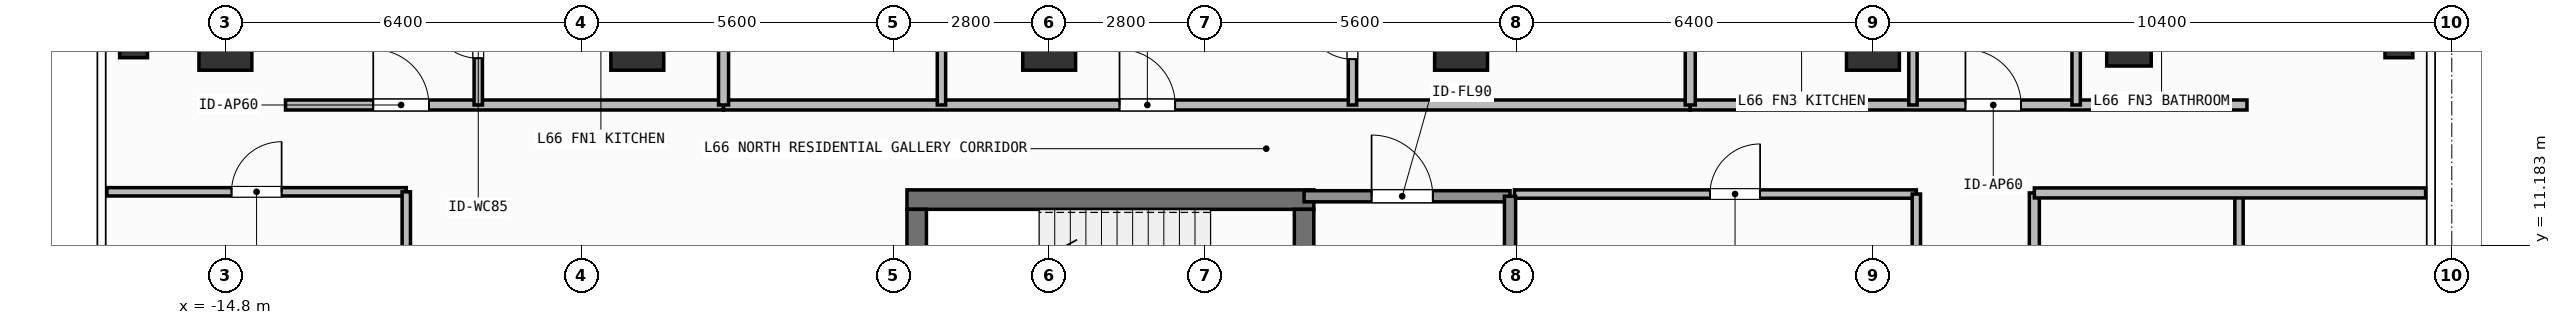
"""IFC4 building model, lengths in metres.
Left out: names, types, materials, properties, quantities, classifications, styles, units other than length and angle.
Written with IfcOpenShell. Run it as: python <this file> out.ifc"""

import sys

from ifc_helpers import new_model, si_unit, direction, frame, frame_2d, origin, origin_2d, place, context, subcontext, project, spatial, rectangle, hollow_rectangle, extrude, element, fill, save


model = new_model("IFC4")
c1 = context("Model", 3, precision=1e-05, world=origin(), true_north=direction((0.0, 1.0)))
c2 = subcontext(c1, "Body", "Model", "MODEL_VIEW")
j1 = project(units=[si_unit("LENGTHUNIT", "METRE"), si_unit("PLANEANGLEUNIT", "RADIAN")], contexts=[c1])
p1 = place(None, origin())
s1 = spatial("IfcSite", under=j1, at=p1, CompositionType="ELEMENT")
p2 = place(p1, origin())
s2 = spatial("IfcBuilding", under=s1, at=p2, CompositionType="ELEMENT")
p3 = place(p2, frame((0.0, 0.0, 270.3)))
s3 = spatial("IfcBuildingStorey", under=s2, at=p3, CompositionType="ELEMENT", Elevation=270.3)
p4 = place(p3, frame((-2.555, 12.0, 0.0), z_axis=(0.0, 0.0, 1.0), x_axis=(1.0, 0.0, 0.0)))
e1 = element("IfcWall", 1, at=p4, inside=s3, PredefinedType="SHEAR", context=c2, shape_type="SweptSolid", body=[
    extrude(rectangle(XDim=7.31, YDim=0.35, at=frame_2d((3.655, 0.0))), origin(), (0.0, 0.0, 1.0), 3.9),
])
p5 = place(p3, frame((-2.38, 8.9, 0.0), z_axis=(0.0, 0.0, 1.0), x_axis=(0.0, 1.0, 0.0)))
e2 = element("IfcWall", 2, at=p5, inside=s3, PredefinedType="SHEAR", context=c2, shape_type="SweptSolid", body=[
    extrude(rectangle(XDim=2.925, YDim=0.35, at=frame_2d((1.462, 0.0))), origin(), (0.0, 0.0, 1.0), 3.9),
])
p6 = place(p3, frame((4.58, 11.825, 0.0), z_axis=(0.0, 0.0, 1.0), x_axis=(0.0, -1.0, 0.0)))
e3 = element("IfcWall", 3, at=p6, inside=s3, PredefinedType="SHEAR", context=c2, shape_type="SweptSolid", body=[
    extrude(rectangle(XDim=2.925, YDim=0.35, at=frame_2d((1.462, 0.0))), origin(), (0.0, 0.0, 1.0), 3.9),
])
p7 = place(p6, frame((0.913, 0.0, 0.0)))
e4 = element("IfcOpeningElement", 4, at=p7, cuts=e3, PredefinedType="OPENING", context=c2, shape_type="SweptSolid", body=[
    extrude(rectangle(XDim=1.1, YDim=2.15, at=frame_2d((0.55, 1.075))), frame((0.0, 0.185, 0.0), z_axis=(0.0, -1.0, 0.0), x_axis=(1.0, 0.0, 0.0)), (0.0, 0.0, 1.0), 0.37),
])
for number, where, z_axis, x_axis in (
    (5, (-14.8, 14.8, 0.0), (0.0, 0.0, 1.0), (1.0, 0.0, 0.0)),
    (6, (-7.4, 14.8, 0.0), (0.0, 0.0, 1.0), (1.0, 0.0, 0.0)),
    (7, (0.0, 14.8, 0.0), (0.0, 0.0, 1.0), (1.0, 0.0, 0.0)),
    (8, (7.4, 14.8, 0.0), (0.0, 0.0, 1.0), (1.0, 0.0, 0.0)),
    (9, (14.8, 14.8, 0.0), (0.0, 0.0, 1.0), (1.0, 0.0, 0.0)),
):
    element("IfcColumn", number, at=place(p3, frame(where, z_axis=z_axis, x_axis=x_axis)), inside=s3, PredefinedType="COLUMN", context=c2, shape_type="SweptSolid", body=[
        extrude(rectangle(XDim=0.95, YDim=0.95, at=origin_2d()), origin(), (0.0, 0.0, 1.0), 3.9),
    ])
p8 = place(p3, frame((19.4, 14.8, 0.0), z_axis=(0.0, 0.0, 1.0), x_axis=(1.0, 0.0, 0.0)))
e10 = element("IfcColumn", 10, at=p8, inside=s3, PredefinedType="COLUMN", context=c2, shape_type="SweptSolid", body=[
    extrude(hollow_rectangle(XDim=0.8, YDim=0.8, WallThickness=0.036, at=origin_2d()), origin(), (0.0, 0.0, 1.0), 3.9),
])
for number, where, z_axis, x_axis in (
    (11, (-16.45, 14.8, 0.0), (0.0, 0.0, 1.0), (1.0, 0.0, 0.0)),
    (12, (24.25, 14.8, 0.0), (0.0, 0.0, 1.0), (1.0, 0.0, 0.0)),
):
    element("IfcColumn", number, at=place(p3, frame(where, z_axis=z_axis, x_axis=x_axis)), inside=s3, PredefinedType="COLUMN", context=c2, shape_type="SweptSolid", body=[
        extrude(hollow_rectangle(XDim=0.5, YDim=0.5, WallThickness=0.025, at=origin_2d()), origin(), (0.0, 0.0, 1.0), 3.9),
    ])
p9 = place(p3, frame((4.58, 12.06, 0.0), z_axis=(0.0, 0.0, 1.0), x_axis=(1.0, 0.0, 0.0)))
e13 = element("IfcWall", 13, at=p9, inside=s3, PredefinedType="SOLIDWALL", context=c2, shape_type="SweptSolid", body=[
    extrude(rectangle(XDim=3.7, YDim=0.2, at=frame_2d((1.85, 0.0))), origin(), (0.0, 0.0, 1.0), 3.68),
])
p10 = place(p9, frame((1.212, 0.0, 0.0)))
e14 = element("IfcOpeningElement", 14, at=p10, cuts=e13, PredefinedType="OPENING", context=c2, shape_type="SweptSolid", body=[
    extrude(rectangle(XDim=1.1, YDim=2.15, at=frame_2d((0.55, 1.075))), frame((0.0, 0.11, 0.0), z_axis=(0.0, -1.0, 0.0), x_axis=(1.0, 0.0, 0.0)), (0.0, 0.0, 1.0), 0.22),
])
p11 = place(p3, frame((8.36, 12.1, 0.0), z_axis=(0.0, 0.0, 1.0), x_axis=(1.0, 0.0, 0.0)))
e15 = element("IfcWall", 15, at=p11, inside=s3, PredefinedType="PARTITIONING", context=c2, shape_type="SweptSolid", body=[
    extrude(rectangle(XDim=7.22, YDim=0.15, at=frame_2d((3.61, 0.0))), origin(), (0.0, 0.0, 1.0), 3.68),
])
p12 = place(p11, frame((3.513, 0.0, 0.0)))
e16 = element("IfcOpeningElement", 16, at=p12, cuts=e15, PredefinedType="OPENING", context=c2, shape_type="SweptSolid", body=[
    extrude(rectangle(XDim=0.9, YDim=2.1, at=frame_2d((0.45, 1.05))), frame((0.0, 0.085, 0.0), z_axis=(0.0, -1.0, 0.0), x_axis=(1.0, 0.0, 0.0)), (0.0, 0.0, 1.0), 0.17),
])
p13 = place(p3, frame((-13.72, 13.7, 0.0), z_axis=(0.0, 0.0, 1.0), x_axis=(1.0, 0.0, 0.0)))
e17 = element("IfcWall", 17, at=p13, inside=s3, PredefinedType="PARTITIONING", context=c2, shape_type="SweptSolid", body=[
    extrude(rectangle(XDim=7.87, YDim=0.18, at=frame_2d((3.935, 0.0))), origin(), (0.0, 0.0, 1.0), 3.68),
])
p14 = place(p13, frame((1.576, 0.0, 0.0)))
e18 = element("IfcOpeningElement", 18, at=p14, cuts=e17, PredefinedType="OPENING", context=c2, shape_type="SweptSolid", body=[
    extrude(rectangle(XDim=1.0, YDim=2.2, at=frame_2d((0.5, 1.1))), frame((0.0, 0.1, 0.0), z_axis=(0.0, -1.0, 0.0), x_axis=(1.0, 0.0, 0.0)), (0.0, 0.0, 1.0), 0.2),
])
p15 = place(p3, frame((-10.257, 13.7, 0.0), z_axis=(0.0, 0.0, 1.0), x_axis=(0.0, 1.0, 0.0)))
e19 = element("IfcWall", 19, at=p15, inside=s3, PredefinedType="PARTITIONING", context=c2, shape_type="SweptSolid", body=[
    extrude(rectangle(XDim=2.359, YDim=0.15, at=frame_2d((1.18, 0.0))), origin(), (0.0, 0.0, 1.0), 3.68),
])
p16 = place(p15, frame((0.839, 0.0, 0.0)))
e20 = element("IfcOpeningElement", 20, at=p16, cuts=e19, PredefinedType="OPENING", context=c2, shape_type="SweptSolid", body=[
    extrude(rectangle(XDim=0.85, YDim=2.1, at=frame_2d((0.425, 1.05))), frame((0.0, 0.085, 0.0), z_axis=(0.0, -1.0, 0.0), x_axis=(1.0, 0.0, 0.0)), (0.0, 0.0, 1.0), 0.17),
])
p17 = place(p3, frame((-5.85, 13.7, 0.0), z_axis=(0.0, 0.0, 1.0), x_axis=(1.0, 0.0, 0.0)))
e21 = element("IfcWall", 21, at=p17, inside=s3, PredefinedType="PARTITIONING", context=c2, shape_type="SweptSolid", body=[
    extrude(rectangle(XDim=17.368, YDim=0.18, at=frame_2d((8.684, 0.0))), origin(), (0.0, 0.0, 1.0), 3.68),
])
p18 = place(p17, frame((7.114, 0.0, 0.0)))
e22 = element("IfcOpeningElement", 22, at=p18, cuts=e21, PredefinedType="OPENING", context=c2, shape_type="SweptSolid", body=[
    extrude(rectangle(XDim=1.0, YDim=2.2, at=frame_2d((0.5, 1.1))), frame((0.0, 0.1, 0.0), z_axis=(0.0, -1.0, 0.0), x_axis=(1.0, 0.0, 0.0)), (0.0, 0.0, 1.0), 0.2),
])
p19 = place(p3, frame((-1.935, 13.7, 0.0), z_axis=(0.0, 0.0, 1.0), x_axis=(0.0, 1.0, 0.0)))
e23 = element("IfcWall", 23, at=p19, inside=s3, PredefinedType="PARTITIONING", context=c2, shape_type="SweptSolid", body=[
    extrude(rectangle(XDim=4.044, YDim=0.15, at=frame_2d((2.022, 0.0))), origin(), (0.0, 0.0, 1.0), 3.68),
])
p20 = place(p19, frame((1.597, 0.0, 0.0)))
e24 = element("IfcOpeningElement", 24, at=p20, cuts=e23, PredefinedType="OPENING", context=c2, shape_type="SweptSolid", body=[
    extrude(rectangle(XDim=0.85, YDim=2.1, at=frame_2d((0.425, 1.05))), frame((0.0, 0.085, 0.0), z_axis=(0.0, -1.0, 0.0), x_axis=(1.0, 0.0, 0.0)), (0.0, 0.0, 1.0), 0.17),
])
p21 = place(p3, frame((5.449, 13.7, 0.0), z_axis=(0.0, 0.0, 1.0), x_axis=(0.0, 1.0, 0.0)))
e25 = element("IfcWall", 25, at=p21, inside=s3, PredefinedType="PARTITIONING", context=c2, shape_type="SweptSolid", body=[
    extrude(rectangle(XDim=2.661, YDim=0.15, at=frame_2d((1.331, 0.0))), origin(), (0.0, 0.0, 1.0), 3.68),
])
p22 = place(p21, frame((0.823, 0.0, 0.0)))
e26 = element("IfcOpeningElement", 26, at=p22, cuts=e25, PredefinedType="OPENING", context=c2, shape_type="SweptSolid", body=[
    extrude(rectangle(XDim=0.85, YDim=2.1, at=frame_2d((0.425, 1.05))), frame((0.0, 0.085, 0.0), z_axis=(0.0, -1.0, 0.0), x_axis=(1.0, 0.0, 0.0)), (0.0, 0.0, 1.0), 0.17),
])
p23 = place(p3, frame((11.518, 13.7, 0.0), z_axis=(0.0, 0.0, 1.0), x_axis=(1.0, 0.0, 0.0)))
e27 = element("IfcWall", 27, at=p23, inside=s3, PredefinedType="PARTITIONING", context=c2, shape_type="SweptSolid", body=[
    extrude(rectangle(XDim=10.002, YDim=0.18, at=frame_2d((5.001, 0.0))), origin(), (0.0, 0.0, 1.0), 3.68),
])
p24 = place(p23, frame((4.944, 0.0, 0.0)))
e28 = element("IfcOpeningElement", 28, at=p24, cuts=e27, PredefinedType="OPENING", context=c2, shape_type="SweptSolid", body=[
    extrude(rectangle(XDim=1.0, YDim=2.2, at=frame_2d((0.5, 1.1))), frame((0.0, 0.1, 0.0), z_axis=(0.0, -1.0, 0.0), x_axis=(1.0, 0.0, 0.0)), (0.0, 0.0, 1.0), 0.2),
])
p25 = place(p3, frame((15.519, 13.7, 0.0), z_axis=(0.0, 0.0, 1.0), x_axis=(0.0, 1.0, 0.0)))
e29 = element("IfcWall", 29, at=p25, inside=s3, PredefinedType="PARTITIONING", context=c2, shape_type="SweptSolid", body=[
    extrude(rectangle(XDim=3.721, YDim=0.15, at=frame_2d((1.86, 0.0))), origin(), (0.0, 0.0, 1.0), 3.68),
])
p26 = place(p25, frame((1.691, 0.0, 0.0)))
e30 = element("IfcOpeningElement", 30, at=p26, cuts=e29, PredefinedType="OPENING", context=c2, shape_type="SweptSolid", body=[
    extrude(rectangle(XDim=0.85, YDim=2.1, at=frame_2d((0.425, 1.05))), frame((0.0, 0.085, 0.0), z_axis=(0.0, -1.0, 0.0), x_axis=(1.0, 0.0, 0.0)), (0.0, 0.0, 1.0), 0.17),
])
p27 = place(p3, frame((18.451, 13.7, 0.0), z_axis=(0.0, 0.0, 1.0), x_axis=(0.0, 1.0, 0.0)))
e31 = element("IfcWall", 31, at=p27, inside=s3, PredefinedType="PARTITIONING", context=c2, shape_type="SweptSolid", body=[
    extrude(rectangle(XDim=3.721, YDim=0.15, at=frame_2d((1.86, 0.0))), origin(), (0.0, 0.0, 1.0), 3.68),
])
p28 = place(p27, frame((1.691, 0.0, 0.0)))
e32 = element("IfcOpeningElement", 32, at=p28, cuts=e31, PredefinedType="OPENING", context=c2, shape_type="SweptSolid", body=[
    extrude(rectangle(XDim=0.85, YDim=2.1, at=frame_2d((0.425, 1.05))), frame((0.0, 0.085, 0.0), z_axis=(0.0, -1.0, 0.0), x_axis=(1.0, 0.0, 0.0)), (0.0, 0.0, 1.0), 0.17),
])
p29 = place(p3, frame((-16.93, 12.14, 0.0), z_axis=(0.0, 0.0, 1.0), x_axis=(1.0, 0.0, 0.0)))
e33 = element("IfcWall", 33, at=p29, inside=s3, PredefinedType="PARTITIONING", context=c2, shape_type="SweptSolid", body=[
    extrude(rectangle(XDim=5.38, YDim=0.15, at=frame_2d((2.69, 0.0))), origin(), (0.0, 0.0, 1.0), 3.68),
])
p30 = place(p29, frame((2.24, 0.0, 0.0)))
e34 = element("IfcOpeningElement", 34, at=p30, cuts=e33, PredefinedType="OPENING", context=c2, shape_type="SweptSolid", body=[
    extrude(rectangle(XDim=0.9, YDim=2.1, at=frame_2d((0.45, 1.05))), frame((0.0, 0.085, 0.0), z_axis=(0.0, -1.0, 0.0), x_axis=(1.0, 0.0, 0.0)), (0.0, 0.0, 1.0), 0.17),
])
p31 = place(p3, frame((17.7, -12.12, 0.0), z_axis=(0.0, 0.0, 1.0), x_axis=(0.0, 1.0, 0.0)))
e35 = element("IfcWall", 35, at=p31, inside=s3, PredefinedType="PARTITIONING", context=c2, shape_type="SweptSolid", body=[
    extrude(rectangle(XDim=24.24, YDim=0.18, at=frame_2d((12.12, 0.0))), origin(), (0.0, 0.0, 1.0), 3.68),
])
p32 = place(p31, frame((11.62, 0.0, 0.0)))
e36 = element("IfcOpeningElement", 36, at=p32, cuts=e35, PredefinedType="OPENING", context=c2, shape_type="SweptSolid", body=[
    extrude(rectangle(XDim=1.0, YDim=2.2, at=frame_2d((0.5, 1.1))), frame((0.0, 0.1, 0.0), z_axis=(0.0, -1.0, 0.0), x_axis=(1.0, 0.0, 0.0)), (0.0, 0.0, 1.0), 0.2),
])
p33 = place(p3, frame((8.28, 8.725, 0.0), z_axis=(0.0, 0.0, 1.0), x_axis=(0.0, 1.0, 0.0)))
e37 = element("IfcWall", 37, at=p33, inside=s3, PredefinedType="SOLIDWALL", context=c2, shape_type="SweptSolid", body=[
    extrude(rectangle(XDim=3.335, YDim=0.2, at=frame_2d((1.667, 0.0))), origin(), (0.0, 0.0, 1.0), 3.68),
])
p34 = place(p3, frame((15.58, 5.85, 0.0), z_axis=(0.0, 0.0, 1.0), x_axis=(0.0, 1.0, 0.0)))
e38 = element("IfcWall", 38, at=p34, inside=s3, PredefinedType="PARTITIONING", context=c2, shape_type="SweptSolid", body=[
    extrude(rectangle(XDim=6.25, YDim=0.15, at=frame_2d((3.125, 0.0))), origin(), (0.0, 0.0, 1.0), 3.68),
])
for number, where, z_axis, x_axis in (
    (39, (-5.85, 13.7, 0.0), (0.0, 0.0, 1.0), (0.0, 1.0, 0.0)),
    (40, (11.518, 13.7, 0.0), (0.0, 0.0, 1.0), (0.0, 1.0, 0.0)),
):
    element("IfcWall", number, at=place(p3, frame(where, z_axis=z_axis, x_axis=x_axis)), inside=s3, PredefinedType="PARTITIONING", context=c2, shape_type="SweptSolid", body=[
        extrude(rectangle(XDim=7.33, YDim=0.18, at=frame_2d((3.665, 0.0))), origin(), (0.0, 0.0, 1.0), 3.68),
    ])
p35 = place(p3, frame((-11.55, 4.1, 0.0), z_axis=(0.0, 0.0, 1.0), x_axis=(0.0, 1.0, 0.0)))
e41 = element("IfcWall", 41, at=p35, inside=s3, PredefinedType="PARTITIONING", context=c2, shape_type="SweptSolid", body=[
    extrude(rectangle(XDim=8.04, YDim=0.15, at=frame_2d((4.02, 0.0))), origin(), (0.0, 0.0, 1.0), 3.68),
])
p36 = place(p3, frame((21.377, 5.428, 0.0), z_axis=(0.0, 0.0, 1.0), x_axis=(0.0, 1.0, 0.0)))
e42 = element("IfcWall", 42, at=p36, inside=s3, PredefinedType="PARTITIONING", context=c2, shape_type="SweptSolid", body=[
    extrude(rectangle(XDim=6.692, YDim=0.15, at=frame_2d((3.346, 0.0))), origin(), (0.0, 0.0, 1.0), 3.68),
])
p37 = place(p3, frame((17.7, 12.12, 0.0), z_axis=(0.0, 0.0, 1.0), x_axis=(1.0, 0.0, 0.0)))
e43 = element("IfcWall", 43, at=p37, inside=s3, PredefinedType="PARTITIONING", context=c2, shape_type="SweptSolid", body=[
    extrude(rectangle(XDim=7.03, YDim=0.18, at=frame_2d((3.515, 0.0))), origin(), (0.0, 0.0, 1.0), 3.68),
])
p38 = place(p10, origin())
e44 = element("IfcDoor", 44, at=p38, inside=s3, OperationType="SINGLE_SWING_LEFT", PredefinedType="DOOR", context=c2, shape_type="SweptSolid", body=[
    extrude(rectangle(XDim=1.1, YDim=2.15, at=frame_2d((0.55, 1.075))), frame((0.0, 0.025, 0.0), z_axis=(0.0, -1.0, 0.0), x_axis=(1.0, 0.0, 0.0)), (0.0, 0.0, 1.0), 0.05),
])
fill(e14, e44)
p39 = place(p12, origin())
e45 = element("IfcDoor", 45, at=p39, inside=s3, OperationType="SINGLE_SWING_RIGHT", PredefinedType="DOOR", context=c2, shape_type="SweptSolid", body=[
    extrude(rectangle(XDim=0.9, YDim=2.1, at=frame_2d((0.45, 1.05))), frame((0.0, 0.025, 0.0), z_axis=(0.0, -1.0, 0.0), x_axis=(1.0, 0.0, 0.0)), (0.0, 0.0, 1.0), 0.05),
])
fill(e16, e45)
p40 = place(p14, origin())
e46 = element("IfcDoor", 46, at=p40, inside=s3, OperationType="SINGLE_SWING_LEFT", PredefinedType="DOOR", context=c2, shape_type="SweptSolid", body=[
    extrude(rectangle(XDim=1.0, YDim=2.2, at=frame_2d((0.5, 1.1))), frame((0.0, 0.025, 0.0), z_axis=(0.0, -1.0, 0.0), x_axis=(1.0, 0.0, 0.0)), (0.0, 0.0, 1.0), 0.05),
])
fill(e18, e46)
p41 = place(p16, origin())
e47 = element("IfcDoor", 47, at=p41, inside=s3, OperationType="SINGLE_SWING_RIGHT", PredefinedType="DOOR", context=c2, shape_type="SweptSolid", body=[
    extrude(rectangle(XDim=0.85, YDim=2.1, at=frame_2d((0.425, 1.05))), frame((0.0, 0.025, 0.0), z_axis=(0.0, -1.0, 0.0), x_axis=(1.0, 0.0, 0.0)), (0.0, 0.0, 1.0), 0.05),
])
fill(e20, e47)
p42 = place(p18, origin())
e48 = element("IfcDoor", 48, at=p42, inside=s3, OperationType="SINGLE_SWING_LEFT", PredefinedType="DOOR", context=c2, shape_type="SweptSolid", body=[
    extrude(rectangle(XDim=1.0, YDim=2.2, at=frame_2d((0.5, 1.1))), frame((0.0, 0.025, 0.0), z_axis=(0.0, -1.0, 0.0), x_axis=(1.0, 0.0, 0.0)), (0.0, 0.0, 1.0), 0.05),
])
fill(e22, e48)
p43 = place(p22, origin())
e49 = element("IfcDoor", 49, at=p43, inside=s3, OperationType="SINGLE_SWING_RIGHT", PredefinedType="DOOR", context=c2, shape_type="SweptSolid", body=[
    extrude(rectangle(XDim=0.85, YDim=2.1, at=frame_2d((0.425, 1.05))), frame((0.0, 0.025, 0.0), z_axis=(0.0, -1.0, 0.0), x_axis=(1.0, 0.0, 0.0)), (0.0, 0.0, 1.0), 0.05),
])
fill(e26, e49)
p44 = place(p24, origin())
e50 = element("IfcDoor", 50, at=p44, inside=s3, OperationType="SINGLE_SWING_LEFT", PredefinedType="DOOR", context=c2, shape_type="SweptSolid", body=[
    extrude(rectangle(XDim=1.0, YDim=2.2, at=frame_2d((0.5, 1.1))), frame((0.0, 0.025, 0.0), z_axis=(0.0, -1.0, 0.0), x_axis=(1.0, 0.0, 0.0)), (0.0, 0.0, 1.0), 0.05),
])
fill(e28, e50)
p45 = place(p30, origin())
e51 = element("IfcDoor", 51, at=p45, inside=s3, OperationType="SINGLE_SWING_RIGHT", PredefinedType="DOOR", context=c2, shape_type="SweptSolid", body=[
    extrude(rectangle(XDim=0.9, YDim=2.1, at=frame_2d((0.45, 1.05))), frame((0.0, 0.025, 0.0), z_axis=(0.0, -1.0, 0.0), x_axis=(1.0, 0.0, 0.0)), (0.0, 0.0, 1.0), 0.05),
])
fill(e34, e51)
save(model, sys.argv[1])
